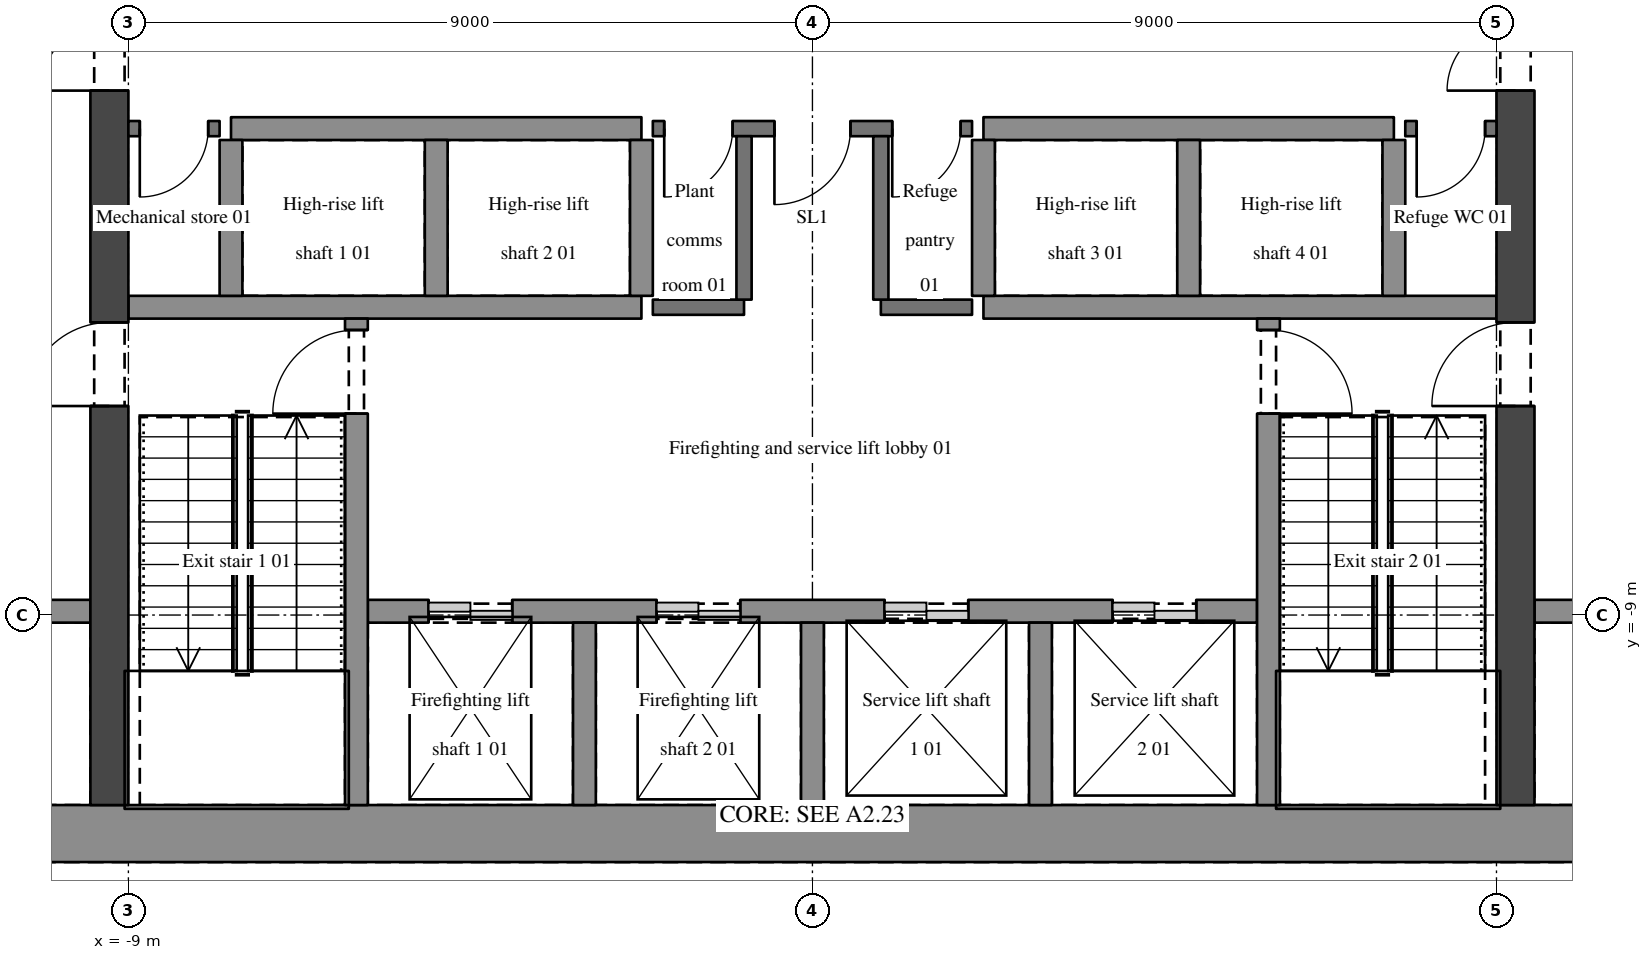
"""IFC4 building model, lengths in metres.
Left out: names, types, materials, properties, quantities, classifications, styles, units other than length and angle.
Written with IfcOpenShell. Run it as: python <this file> out.ifc"""

import sys

from ifc_helpers import new_model, si_unit, direction, frame, frame_2d, origin, place, context, subcontext, project, spatial, rectangle, extrude, element, fill, save


model = new_model("IFC4")
c1 = context("Model", 3, precision=1e-05, world=origin(), true_north=direction((0.0, 1.0)))
c2 = subcontext(c1, "Body", "Model", "MODEL_VIEW")
j1 = project(units=[si_unit("LENGTHUNIT", "METRE"), si_unit("PLANEANGLEUNIT", "RADIAN")], contexts=[c1])
p1 = place(None, origin())
s1 = spatial("IfcSite", under=j1, at=p1, CompositionType="ELEMENT")
p2 = place(p1, origin())
s2 = spatial("IfcBuilding", under=s1, at=p2, CompositionType="ELEMENT")
p3 = place(p2, frame((0.0, 0.0, 167.7)))
s3 = spatial("IfcBuildingStorey", under=s2, at=p3, CompositionType="ELEMENT", Elevation=167.7)
p4 = place(p3, frame((-13.0, -11.875, 0.0), z_axis=(0.0, 0.0, 1.0), x_axis=(1.0, 0.0, 0.0)))
e1 = element("IfcWall", 1, at=p4, inside=s3, PredefinedType="SHEAR", context=c2, shape_type="SweptSolid", body=[
    extrude(rectangle(XDim=26.0, YDim=0.75, at=frame_2d((13.0, 0.0))), origin(), (0.0, 0.0, 1.0), 4.5),
])
p5 = place(p3, frame((-9.25, -11.5, 0.0), z_axis=(0.0, 0.0, 1.0), x_axis=(0.0, 1.0, 0.0)))
e2 = element("IfcWall", 2, at=p5, inside=s3, PredefinedType="SHEAR", context=c2, shape_type="SweptSolid", body=[
    extrude(rectangle(XDim=11.65, YDim=0.5, at=frame_2d((5.825, 0.0))), origin(), (0.0, 0.0, 1.0), 4.5),
])
p6 = place(p5, frame((9.4, 0.0, 0.0)))
e3 = element("IfcOpeningElement", 3, at=p6, cuts=e2, PredefinedType="OPENING", context=c2, shape_type="SweptSolid", body=[
    extrude(rectangle(XDim=1.8, YDim=2.1, at=frame_2d((0.9, 1.05))), frame((0.0, 0.26, 0.0), z_axis=(0.0, -1.0, 0.0), x_axis=(1.0, 0.0, 0.0)), (0.0, 0.0, 1.0), 0.52),
])
p7 = place(p5, frame((5.25, 0.0, 0.0)))
e4 = element("IfcOpeningElement", 4, at=p7, cuts=e2, PredefinedType="OPENING", context=c2, shape_type="SweptSolid", body=[
    extrude(rectangle(XDim=1.1, YDim=2.1, at=frame_2d((0.55, 1.05))), frame((0.0, 0.26, 0.0), z_axis=(0.0, -1.0, 0.0), x_axis=(1.0, 0.0, 0.0)), (0.0, 0.0, 1.0), 0.52),
])
p8 = place(p3, frame((9.25, -11.5, 0.0), z_axis=(0.0, 0.0, 1.0), x_axis=(0.0, 1.0, 0.0)))
e5 = element("IfcWall", 5, at=p8, inside=s3, PredefinedType="SHEAR", context=c2, shape_type="SweptSolid", body=[
    extrude(rectangle(XDim=11.65, YDim=0.5, at=frame_2d((5.825, 0.0))), origin(), (0.0, 0.0, 1.0), 4.5),
])
p9 = place(p8, frame((9.4, 0.0, 0.0)))
e6 = element("IfcOpeningElement", 6, at=p9, cuts=e5, PredefinedType="OPENING", context=c2, shape_type="SweptSolid", body=[
    extrude(rectangle(XDim=1.8, YDim=2.1, at=frame_2d((0.9, 1.05))), frame((0.0, 0.26, 0.0), z_axis=(0.0, -1.0, 0.0), x_axis=(1.0, 0.0, 0.0)), (0.0, 0.0, 1.0), 0.52),
])
p10 = place(p8, frame((5.25, 0.0, 0.0)))
e7 = element("IfcOpeningElement", 7, at=p10, cuts=e5, PredefinedType="OPENING", context=c2, shape_type="SweptSolid", body=[
    extrude(rectangle(XDim=1.1, YDim=2.1, at=frame_2d((0.55, 1.05))), frame((0.0, 0.26, 0.0), z_axis=(0.0, -1.0, 0.0), x_axis=(1.0, 0.0, 0.0)), (0.0, 0.0, 1.0), 0.52),
])
p11 = place(p3, frame((-12.25, -8.95, 0.0), z_axis=(0.0, 0.0, 1.0), x_axis=(1.0, 0.0, 0.0)))
e8 = element("IfcWall", 8, at=p11, inside=s3, PredefinedType="SHEAR", context=c2, shape_type="SweptSolid", body=[
    extrude(rectangle(XDim=2.75, YDim=0.3, at=frame_2d((1.375, 0.0))), origin(), (0.0, 0.0, 1.0), 4.5),
])
p12 = place(p3, frame((-5.85, -8.95, 0.0), z_axis=(0.0, 0.0, 1.0), x_axis=(1.0, 0.0, 0.0)))
e9 = element("IfcWall", 9, at=p12, inside=s3, PredefinedType="SHEAR", context=c2, shape_type="SweptSolid", body=[
    extrude(rectangle(XDim=11.7, YDim=0.3, at=frame_2d((5.85, 0.0))), origin(), (0.0, 0.0, 1.0), 4.5),
])
p13 = place(p12, frame((0.8, 0.0, 0.0)))
e10 = element("IfcOpeningElement", 10, at=p13, cuts=e9, PredefinedType="OPENING", context=c2, shape_type="SweptSolid", body=[
    extrude(rectangle(XDim=1.1, YDim=2.1, at=frame_2d((0.55, 1.05))), frame((0.0, 0.16, 0.0), z_axis=(0.0, -1.0, 0.0), x_axis=(1.0, 0.0, 0.0)), (0.0, 0.0, 1.0), 0.32),
])
p14 = place(p12, frame((3.8, 0.0, 0.0)))
e11 = element("IfcOpeningElement", 11, at=p14, cuts=e9, PredefinedType="OPENING", context=c2, shape_type="SweptSolid", body=[
    extrude(rectangle(XDim=1.1, YDim=2.1, at=frame_2d((0.55, 1.05))), frame((0.0, 0.16, 0.0), z_axis=(0.0, -1.0, 0.0), x_axis=(1.0, 0.0, 0.0)), (0.0, 0.0, 1.0), 0.32),
])
p15 = place(p12, frame((6.8, 0.0, 0.0)))
e12 = element("IfcOpeningElement", 12, at=p15, cuts=e9, PredefinedType="OPENING", context=c2, shape_type="SweptSolid", body=[
    extrude(rectangle(XDim=1.1, YDim=2.1, at=frame_2d((0.55, 1.05))), frame((0.0, 0.16, 0.0), z_axis=(0.0, -1.0, 0.0), x_axis=(1.0, 0.0, 0.0)), (0.0, 0.0, 1.0), 0.32),
])
p16 = place(p12, frame((9.8, 0.0, 0.0)))
e13 = element("IfcOpeningElement", 13, at=p16, cuts=e9, PredefinedType="OPENING", context=c2, shape_type="SweptSolid", body=[
    extrude(rectangle(XDim=1.1, YDim=2.1, at=frame_2d((0.55, 1.05))), frame((0.0, 0.16, 0.0), z_axis=(0.0, -1.0, 0.0), x_axis=(1.0, 0.0, 0.0)), (0.0, 0.0, 1.0), 0.32),
])
p17 = place(p3, frame((9.5, -8.95, 0.0), z_axis=(0.0, 0.0, 1.0), x_axis=(1.0, 0.0, 0.0)))
e14 = element("IfcWall", 14, at=p17, inside=s3, PredefinedType="SHEAR", context=c2, shape_type="SweptSolid", body=[
    extrude(rectangle(XDim=2.75, YDim=0.3, at=frame_2d((1.375, 0.0))), origin(), (0.0, 0.0, 1.0), 4.5),
])
p18 = place(p3, frame((-9.0, -4.95, 0.0), z_axis=(0.0, 0.0, 1.0), x_axis=(1.0, 0.0, 0.0)))
e15 = element("IfcWall", 15, at=p18, inside=s3, PredefinedType="SHEAR", context=c2, shape_type="SweptSolid", body=[
    extrude(rectangle(XDim=6.75, YDim=0.3, at=frame_2d((3.375, 0.0))), origin(), (0.0, 0.0, 1.0), 4.5),
])
for number, where, z_axis, x_axis in (
    (16, (-2.1, -4.95, 0.0), (0.0, 0.0, 1.0), (1.0, 0.0, 0.0)),
    (17, (0.9, -4.95, 0.0), (0.0, 0.0, 1.0), (1.0, 0.0, 0.0)),
):
    element("IfcWall", number, at=place(p3, frame(where, z_axis=z_axis, x_axis=x_axis)), inside=s3, PredefinedType="SOLIDWALL", context=c2, shape_type="SweptSolid", body=[
        extrude(rectangle(XDim=1.2, YDim=0.2, at=frame_2d((0.6, 0.0))), origin(), (0.0, 0.0, 1.0), 4.2),
    ])
p19 = place(p3, frame((2.25, -4.95, 0.0), z_axis=(0.0, 0.0, 1.0), x_axis=(1.0, 0.0, 0.0)))
e18 = element("IfcWall", 18, at=p19, inside=s3, PredefinedType="SHEAR", context=c2, shape_type="SweptSolid", body=[
    extrude(rectangle(XDim=6.75, YDim=0.3, at=frame_2d((3.375, 0.0))), origin(), (0.0, 0.0, 1.0), 4.5),
])
p20 = place(p3, frame((-7.8, -2.6, 0.0), z_axis=(0.0, 0.0, 1.0), x_axis=(-1.0, 0.0, 0.0)))
e19 = element("IfcWall", 19, at=p20, inside=s3, PredefinedType="SOLIDWALL", context=c2, shape_type="SweptSolid", body=[
    extrude(rectangle(XDim=1.2, YDim=0.2, at=frame_2d((0.6, 0.0))), origin(), (0.0, 0.0, 1.0), 4.2),
])
p21 = place(p20, frame((0.15, 0.0, 0.0)))
e20 = element("IfcOpeningElement", 20, at=p21, cuts=e19, PredefinedType="OPENING", context=c2, shape_type="SweptSolid", body=[
    extrude(rectangle(XDim=0.9, YDim=2.1, at=frame_2d((0.45, 1.05))), frame((0.0, 0.11, 0.0), z_axis=(0.0, -1.0, 0.0), x_axis=(1.0, 0.0, 0.0)), (0.0, 0.0, 1.0), 0.22),
])
p22 = place(p3, frame((-7.65, -2.6, 0.0), z_axis=(0.0, 0.0, 1.0), x_axis=(1.0, 0.0, 0.0)))
e21 = element("IfcWall", 21, at=p22, inside=s3, PredefinedType="SHEAR", context=c2, shape_type="SweptSolid", body=[
    extrude(rectangle(XDim=5.4, YDim=0.3, at=frame_2d((2.7, 0.0))), origin(), (0.0, 0.0, 1.0), 4.5),
])
p23 = place(p3, frame((2.1, -2.6, 0.0), z_axis=(0.0, 0.0, 1.0), x_axis=(-1.0, 0.0, 0.0)))
e22 = element("IfcWall", 22, at=p23, inside=s3, PredefinedType="SOLIDWALL", context=c2, shape_type="SweptSolid", body=[
    extrude(rectangle(XDim=4.2, YDim=0.2, at=frame_2d((2.1, 0.0))), origin(), (0.0, 0.0, 1.0), 4.2),
])
p24 = place(p23, frame((1.6, 0.0, 0.0)))
e23 = element("IfcOpeningElement", 23, at=p24, cuts=e22, PredefinedType="OPENING", context=c2, shape_type="SweptSolid", body=[
    extrude(rectangle(XDim=1.0, YDim=2.1, at=frame_2d((0.5, 1.05))), frame((0.0, 0.11, 0.0), z_axis=(0.0, -1.0, 0.0), x_axis=(1.0, 0.0, 0.0)), (0.0, 0.0, 1.0), 0.22),
])
p25 = place(p23, frame((3.15, 0.0, 0.0)))
e24 = element("IfcOpeningElement", 24, at=p25, cuts=e22, PredefinedType="OPENING", context=c2, shape_type="SweptSolid", body=[
    extrude(rectangle(XDim=0.9, YDim=2.1, at=frame_2d((0.45, 1.05))), frame((0.0, 0.11, 0.0), z_axis=(0.0, -1.0, 0.0), x_axis=(1.0, 0.0, 0.0)), (0.0, 0.0, 1.0), 0.22),
])
p26 = place(p23, frame((0.15, 0.0, 0.0)))
e25 = element("IfcOpeningElement", 25, at=p26, cuts=e22, PredefinedType="OPENING", context=c2, shape_type="SweptSolid", body=[
    extrude(rectangle(XDim=0.9, YDim=2.1, at=frame_2d((0.45, 1.05))), frame((0.0, 0.11, 0.0), z_axis=(0.0, -1.0, 0.0), x_axis=(1.0, 0.0, 0.0)), (0.0, 0.0, 1.0), 0.22),
])
p27 = place(p3, frame((2.25, -2.6, 0.0), z_axis=(0.0, 0.0, 1.0), x_axis=(1.0, 0.0, 0.0)))
e26 = element("IfcWall", 26, at=p27, inside=s3, PredefinedType="SHEAR", context=c2, shape_type="SweptSolid", body=[
    extrude(rectangle(XDim=5.4, YDim=0.3, at=frame_2d((2.7, 0.0))), origin(), (0.0, 0.0, 1.0), 4.5),
])
p28 = place(p3, frame((9.0, -2.6, 0.0), z_axis=(0.0, 0.0, 1.0), x_axis=(-1.0, 0.0, 0.0)))
e27 = element("IfcWall", 27, at=p28, inside=s3, PredefinedType="SOLIDWALL", context=c2, shape_type="SweptSolid", body=[
    extrude(rectangle(XDim=1.2, YDim=0.2, at=frame_2d((0.6, 0.0))), origin(), (0.0, 0.0, 1.0), 4.2),
])
p29 = place(p28, frame((0.15, 0.0, 0.0)))
e28 = element("IfcOpeningElement", 28, at=p29, cuts=e27, PredefinedType="OPENING", context=c2, shape_type="SweptSolid", body=[
    extrude(rectangle(XDim=0.9, YDim=2.1, at=frame_2d((0.45, 1.05))), frame((0.0, 0.11, 0.0), z_axis=(0.0, -1.0, 0.0), x_axis=(1.0, 0.0, 0.0)), (0.0, 0.0, 1.0), 0.22),
])
p30 = place(p3, frame((-7.65, -4.8, 0.0), z_axis=(0.0, 0.0, 1.0), x_axis=(0.0, 1.0, 0.0)))
e29 = element("IfcWall", 29, at=p30, inside=s3, PredefinedType="SHEAR", context=c2, shape_type="SweptSolid", body=[
    extrude(rectangle(XDim=2.05, YDim=0.3, at=frame_2d((1.025, 0.0))), origin(), (0.0, 0.0, 1.0), 4.5),
])
p31 = place(p3, frame((-6.0, -11.5, 0.0), z_axis=(0.0, 0.0, 1.0), x_axis=(0.0, 1.0, 0.0)))
e30 = element("IfcWall", 30, at=p31, inside=s3, PredefinedType="SHEAR", context=c2, shape_type="SweptSolid", body=[
    extrude(rectangle(XDim=6.4, YDim=0.3, at=frame_2d((3.2, 0.0))), origin(), (0.0, 0.0, 1.0), 4.5),
])
p32 = place(p31, frame((5.15, 0.0, 0.0)))
e31 = element("IfcOpeningElement", 31, at=p32, cuts=e30, PredefinedType="OPENING", context=c2, shape_type="SweptSolid", body=[
    extrude(rectangle(XDim=1.1, YDim=2.1, at=frame_2d((0.55, 1.05))), frame((0.0, 0.16, 0.0), z_axis=(0.0, -1.0, 0.0), x_axis=(1.0, 0.0, 0.0)), (0.0, 0.0, 1.0), 0.32),
])
p33 = place(p3, frame((-4.95, -4.8, 0.0), z_axis=(0.0, 0.0, 1.0), x_axis=(0.0, 1.0, 0.0)))
e32 = element("IfcWall", 32, at=p33, inside=s3, PredefinedType="SHEAR", context=c2, shape_type="SweptSolid", body=[
    extrude(rectangle(XDim=2.05, YDim=0.3, at=frame_2d((1.025, 0.0))), origin(), (0.0, 0.0, 1.0), 4.5),
])
p34 = place(p3, frame((-3.0, -11.5, 0.0), z_axis=(0.0, 0.0, 1.0), x_axis=(0.0, 1.0, 0.0)))
e33 = element("IfcWall", 33, at=p34, inside=s3, PredefinedType="SHEAR", context=c2, shape_type="SweptSolid", body=[
    extrude(rectangle(XDim=2.4, YDim=0.3, at=frame_2d((1.2, 0.0))), origin(), (0.0, 0.0, 1.0), 4.5),
])
p35 = place(p3, frame((-2.25, -4.8, 0.0), z_axis=(0.0, 0.0, 1.0), x_axis=(0.0, 1.0, 0.0)))
e34 = element("IfcWall", 34, at=p35, inside=s3, PredefinedType="SHEAR", context=c2, shape_type="SweptSolid", body=[
    extrude(rectangle(XDim=2.05, YDim=0.3, at=frame_2d((1.025, 0.0))), origin(), (0.0, 0.0, 1.0), 4.5),
])
p36 = place(p3, frame((-0.9, -4.85, 0.0), z_axis=(0.0, 0.0, 1.0), x_axis=(0.0, 1.0, 0.0)))
e35 = element("IfcWall", 35, at=p36, inside=s3, PredefinedType="SOLIDWALL", context=c2, shape_type="SweptSolid", body=[
    extrude(rectangle(XDim=2.15, YDim=0.2, at=frame_2d((1.075, 0.0))), origin(), (0.0, 0.0, 1.0), 4.2),
])
p37 = place(p3, frame((0.0, -11.5, 0.0), z_axis=(0.0, 0.0, 1.0), x_axis=(0.0, 1.0, 0.0)))
e36 = element("IfcWall", 36, at=p37, inside=s3, PredefinedType="SHEAR", context=c2, shape_type="SweptSolid", body=[
    extrude(rectangle(XDim=2.4, YDim=0.3, at=frame_2d((1.2, 0.0))), origin(), (0.0, 0.0, 1.0), 4.5),
])
p38 = place(p3, frame((0.9, -4.85, 0.0), z_axis=(0.0, 0.0, 1.0), x_axis=(0.0, 1.0, 0.0)))
e37 = element("IfcWall", 37, at=p38, inside=s3, PredefinedType="SOLIDWALL", context=c2, shape_type="SweptSolid", body=[
    extrude(rectangle(XDim=2.15, YDim=0.2, at=frame_2d((1.075, 0.0))), origin(), (0.0, 0.0, 1.0), 4.2),
])
p39 = place(p3, frame((2.25, -4.8, 0.0), z_axis=(0.0, 0.0, 1.0), x_axis=(0.0, 1.0, 0.0)))
e38 = element("IfcWall", 38, at=p39, inside=s3, PredefinedType="SHEAR", context=c2, shape_type="SweptSolid", body=[
    extrude(rectangle(XDim=2.05, YDim=0.3, at=frame_2d((1.025, 0.0))), origin(), (0.0, 0.0, 1.0), 4.5),
])
p40 = place(p3, frame((3.0, -11.5, 0.0), z_axis=(0.0, 0.0, 1.0), x_axis=(0.0, 1.0, 0.0)))
e39 = element("IfcWall", 39, at=p40, inside=s3, PredefinedType="SHEAR", context=c2, shape_type="SweptSolid", body=[
    extrude(rectangle(XDim=2.4, YDim=0.3, at=frame_2d((1.2, 0.0))), origin(), (0.0, 0.0, 1.0), 4.5),
])
p41 = place(p3, frame((4.95, -4.8, 0.0), z_axis=(0.0, 0.0, 1.0), x_axis=(0.0, 1.0, 0.0)))
e40 = element("IfcWall", 40, at=p41, inside=s3, PredefinedType="SHEAR", context=c2, shape_type="SweptSolid", body=[
    extrude(rectangle(XDim=2.05, YDim=0.3, at=frame_2d((1.025, 0.0))), origin(), (0.0, 0.0, 1.0), 4.5),
])
p42 = place(p3, frame((6.0, -5.1, 0.0), z_axis=(0.0, 0.0, 1.0), x_axis=(0.0, -1.0, 0.0)))
e41 = element("IfcWall", 41, at=p42, inside=s3, PredefinedType="SHEAR", context=c2, shape_type="SweptSolid", body=[
    extrude(rectangle(XDim=6.4, YDim=0.3, at=frame_2d((3.2, 0.0))), origin(), (0.0, 0.0, 1.0), 4.5),
])
p43 = place(p42, frame((0.15, 0.0, 0.0)))
e42 = element("IfcOpeningElement", 42, at=p43, cuts=e41, PredefinedType="OPENING", context=c2, shape_type="SweptSolid", body=[
    extrude(rectangle(XDim=1.1, YDim=2.1, at=frame_2d((0.55, 1.05))), frame((0.0, 0.16, 0.0), z_axis=(0.0, -1.0, 0.0), x_axis=(1.0, 0.0, 0.0)), (0.0, 0.0, 1.0), 0.32),
])
p44 = place(p3, frame((7.65, -4.8, 0.0), z_axis=(0.0, 0.0, 1.0), x_axis=(0.0, 1.0, 0.0)))
e43 = element("IfcWall", 43, at=p44, inside=s3, PredefinedType="SHEAR", context=c2, shape_type="SweptSolid", body=[
    extrude(rectangle(XDim=2.05, YDim=0.3, at=frame_2d((1.025, 0.0))), origin(), (0.0, 0.0, 1.0), 4.5),
])
p45 = place(p9, origin())
e44 = element("IfcDoor", 44, at=p45, inside=s3, OperationType="DOUBLE_DOOR_SINGLE_SWING", PredefinedType="DOOR", context=c2, shape_type="SweptSolid", body=[
    extrude(rectangle(XDim=1.8, YDim=2.1, at=frame_2d((0.9, 1.05))), frame((0.0, 0.025, 0.0), z_axis=(0.0, -1.0, 0.0), x_axis=(1.0, 0.0, 0.0)), (0.0, 0.0, 1.0), 0.05),
])
fill(e6, e44)
p46 = place(p6, origin())
e45 = element("IfcDoor", 45, at=p46, inside=s3, OperationType="DOUBLE_DOOR_SINGLE_SWING", PredefinedType="DOOR", context=c2, shape_type="SweptSolid", body=[
    extrude(rectangle(XDim=1.8, YDim=2.1, at=frame_2d((0.9, 1.05))), frame((0.0, 0.025, 0.0), z_axis=(0.0, -1.0, 0.0), x_axis=(1.0, 0.0, 0.0)), (0.0, 0.0, 1.0), 0.05),
])
fill(e3, e45)
p47 = place(p24, origin())
e46 = element("IfcDoor", 46, at=p47, inside=s3, OperationType="SINGLE_SWING_RIGHT", PredefinedType="DOOR", context=c2, shape_type="SweptSolid", body=[
    extrude(rectangle(XDim=1.0, YDim=2.1, at=frame_2d((0.5, 1.05))), frame((0.0, 0.025, 0.0), z_axis=(0.0, -1.0, 0.0), x_axis=(1.0, 0.0, 0.0)), (0.0, 0.0, 1.0), 0.05),
])
fill(e23, e46)
p48 = place(p32, origin())
e47 = element("IfcDoor", 47, at=p48, inside=s3, OperationType="SINGLE_SWING_LEFT", PredefinedType="DOOR", context=c2, shape_type="SweptSolid", body=[
    extrude(rectangle(XDim=1.1, YDim=2.1, at=frame_2d((0.55, 1.05))), frame((0.0, 0.025, 0.0), z_axis=(0.0, -1.0, 0.0), x_axis=(1.0, 0.0, 0.0)), (0.0, 0.0, 1.0), 0.05),
])
fill(e31, e47)
p49 = place(p7, origin())
e48 = element("IfcDoor", 48, at=p49, inside=s3, OperationType="SINGLE_SWING_LEFT", PredefinedType="DOOR", context=c2, shape_type="SweptSolid", body=[
    extrude(rectangle(XDim=1.1, YDim=2.1, at=frame_2d((0.55, 1.05))), frame((0.0, 0.025, 0.0), z_axis=(0.0, -1.0, 0.0), x_axis=(1.0, 0.0, 0.0)), (0.0, 0.0, 1.0), 0.05),
])
fill(e4, e48)
p50 = place(p43, origin())
e49 = element("IfcDoor", 49, at=p50, inside=s3, OperationType="SINGLE_SWING_RIGHT", PredefinedType="DOOR", context=c2, shape_type="SweptSolid", body=[
    extrude(rectangle(XDim=1.1, YDim=2.1, at=frame_2d((0.55, 1.05))), frame((0.0, 0.025, 0.0), z_axis=(0.0, -1.0, 0.0), x_axis=(1.0, 0.0, 0.0)), (0.0, 0.0, 1.0), 0.05),
])
fill(e42, e49)
p51 = place(p10, origin())
e50 = element("IfcDoor", 50, at=p51, inside=s3, OperationType="SINGLE_SWING_LEFT", PredefinedType="DOOR", context=c2, shape_type="SweptSolid", body=[
    extrude(rectangle(XDim=1.1, YDim=2.1, at=frame_2d((0.55, 1.05))), frame((0.0, 0.025, 0.0), z_axis=(0.0, -1.0, 0.0), x_axis=(1.0, 0.0, 0.0)), (0.0, 0.0, 1.0), 0.05),
])
fill(e7, e50)
p52 = place(p25, origin())
e51 = element("IfcDoor", 51, at=p52, inside=s3, OperationType="SINGLE_SWING_RIGHT", PredefinedType="DOOR", context=c2, shape_type="SweptSolid", body=[
    extrude(rectangle(XDim=0.9, YDim=2.1, at=frame_2d((0.45, 1.05))), frame((0.0, 0.025, 0.0), z_axis=(0.0, -1.0, 0.0), x_axis=(1.0, 0.0, 0.0)), (0.0, 0.0, 1.0), 0.05),
])
fill(e24, e51)
p53 = place(p26, origin())
e52 = element("IfcDoor", 52, at=p53, inside=s3, OperationType="SINGLE_SWING_RIGHT", PredefinedType="DOOR", context=c2, shape_type="SweptSolid", body=[
    extrude(rectangle(XDim=0.9, YDim=2.1, at=frame_2d((0.45, 1.05))), frame((0.0, 0.025, 0.0), z_axis=(0.0, -1.0, 0.0), x_axis=(1.0, 0.0, 0.0)), (0.0, 0.0, 1.0), 0.05),
])
fill(e25, e52)
p54 = place(p29, origin())
e53 = element("IfcDoor", 53, at=p54, inside=s3, OperationType="SINGLE_SWING_RIGHT", PredefinedType="DOOR", context=c2, shape_type="SweptSolid", body=[
    extrude(rectangle(XDim=0.9, YDim=2.1, at=frame_2d((0.45, 1.05))), frame((0.0, 0.025, 0.0), z_axis=(0.0, -1.0, 0.0), x_axis=(1.0, 0.0, 0.0)), (0.0, 0.0, 1.0), 0.05),
])
fill(e28, e53)
p55 = place(p21, origin())
e54 = element("IfcDoor", 54, at=p55, inside=s3, OperationType="SINGLE_SWING_RIGHT", PredefinedType="DOOR", context=c2, shape_type="SweptSolid", body=[
    extrude(rectangle(XDim=0.9, YDim=2.1, at=frame_2d((0.45, 1.05))), frame((0.0, 0.025, 0.0), z_axis=(0.0, -1.0, 0.0), x_axis=(1.0, 0.0, 0.0)), (0.0, 0.0, 1.0), 0.05),
])
fill(e20, e54)
p56 = place(p13, origin())
e55 = element("IfcDoor", 55, at=p56, inside=s3, OperationType="DOUBLE_DOOR_SLIDING", PredefinedType="DOOR", context=c2, shape_type="SweptSolid", body=[
    extrude(rectangle(XDim=1.1, YDim=2.1, at=frame_2d((0.55, 1.05))), frame((0.0, 0.025, 0.0), z_axis=(0.0, -1.0, 0.0), x_axis=(1.0, 0.0, 0.0)), (0.0, 0.0, 1.0), 0.05),
])
fill(e10, e55)
p57 = place(p14, origin())
e56 = element("IfcDoor", 56, at=p57, inside=s3, OperationType="DOUBLE_DOOR_SLIDING", PredefinedType="DOOR", context=c2, shape_type="SweptSolid", body=[
    extrude(rectangle(XDim=1.1, YDim=2.1, at=frame_2d((0.55, 1.05))), frame((0.0, 0.025, 0.0), z_axis=(0.0, -1.0, 0.0), x_axis=(1.0, 0.0, 0.0)), (0.0, 0.0, 1.0), 0.05),
])
fill(e11, e56)
p58 = place(p15, origin())
e57 = element("IfcDoor", 57, at=p58, inside=s3, OperationType="DOUBLE_DOOR_SLIDING", PredefinedType="DOOR", context=c2, shape_type="SweptSolid", body=[
    extrude(rectangle(XDim=1.1, YDim=2.1, at=frame_2d((0.55, 1.05))), frame((0.0, 0.025, 0.0), z_axis=(0.0, -1.0, 0.0), x_axis=(1.0, 0.0, 0.0)), (0.0, 0.0, 1.0), 0.05),
])
fill(e12, e57)
p59 = place(p16, origin())
e58 = element("IfcDoor", 58, at=p59, inside=s3, OperationType="DOUBLE_DOOR_SLIDING", PredefinedType="DOOR", context=c2, shape_type="SweptSolid", body=[
    extrude(rectangle(XDim=1.1, YDim=2.1, at=frame_2d((0.55, 1.05))), frame((0.0, 0.025, 0.0), z_axis=(0.0, -1.0, 0.0), x_axis=(1.0, 0.0, 0.0)), (0.0, 0.0, 1.0), 0.05),
])
fill(e13, e58)
save(model, sys.argv[1])
